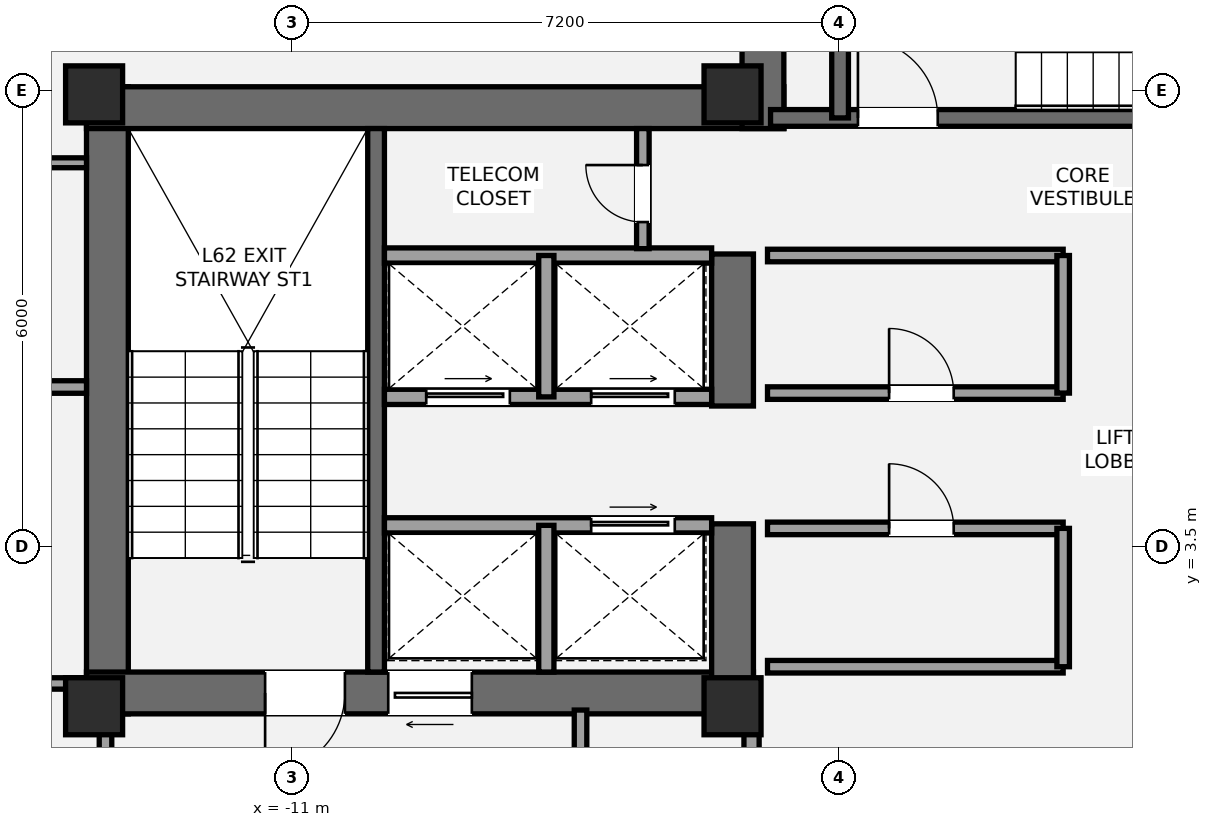
"""IFC4 building model, lengths in metres.
Left out: names, types, materials, properties, quantities, classifications, styles, units other than length and angle.
Written with IfcOpenShell. Run it as: python <this file> out.ifc"""

import sys

from ifc_helpers import new_model, si_unit, direction, frame, frame_2d, origin, origin_2d, place, context, subcontext, project, spatial, rectangle, extrude, element, fill, save


model = new_model("IFC4")
c1 = context("Model", 3, precision=1e-05, world=origin(), true_north=direction((0.0, 1.0)))
c2 = subcontext(c1, "Body", "Model", "MODEL_VIEW")
j1 = project(units=[si_unit("LENGTHUNIT", "METRE"), si_unit("PLANEANGLEUNIT", "RADIAN")], contexts=[c1])
p1 = place(None, origin())
s1 = spatial("IfcSite", under=j1, at=p1, CompositionType="ELEMENT")
p2 = place(p1, origin())
s2 = spatial("IfcBuilding", under=s1, at=p2, CompositionType="ELEMENT")
p3 = place(p2, frame((0.0, 0.0, 222.6)))
s3 = spatial("IfcBuildingStorey", under=s2, at=p3, CompositionType="ELEMENT", Elevation=222.6)
p4 = place(p3, frame((-13.425, 1.3, 0.0), z_axis=(0.0, 0.0, 1.0), x_axis=(0.0, 1.0, 0.0)))
e1 = element("IfcWall", 1, at=p4, inside=s3, PredefinedType="SHEAR", context=c2, shape_type="SweptSolid", body=[
    extrude(rectangle(XDim=8.25, YDim=0.55, at=frame_2d((4.125, 0.0))), origin(), (0.0, 0.0, 1.0), 3.15),
])
p5 = place(p3, frame((-13.7, 9.275, 0.0), z_axis=(0.0, 0.0, 1.0), x_axis=(1.0, 0.0, 0.0)))
e2 = element("IfcWall", 2, at=p5, inside=s3, PredefinedType="SHEAR", context=c2, shape_type="SweptSolid", body=[
    extrude(rectangle(XDim=9.175, YDim=0.55, at=frame_2d((4.587, 0.0))), origin(), (0.0, 0.0, 1.0), 3.15),
])
p6 = place(p3, frame((-4.925, 1.575, 0.0), z_axis=(0.0, 0.0, 1.0), x_axis=(-1.0, 0.0, 0.0)))
e3 = element("IfcWall", 3, at=p6, inside=s3, PredefinedType="SHEAR", context=c2, shape_type="SweptSolid", body=[
    extrude(rectangle(XDim=8.775, YDim=0.55, at=frame_2d((4.387, 0.0))), origin(), (0.0, 0.0, 1.0), 3.15),
])
p7 = place(p6, frame((5.375, 0.0, 0.0)))
e4 = element("IfcOpeningElement", 4, at=p7, cuts=e3, PredefinedType="OPENING", context=c2, shape_type="SweptSolid", body=[
    extrude(rectangle(XDim=1.05, YDim=2.15, at=frame_2d((0.525, 1.075))), frame((0.0, 0.285, 0.0), z_axis=(0.0, -1.0, 0.0), x_axis=(1.0, 0.0, 0.0)), (0.0, 0.0, 1.0), 0.57),
])
p8 = place(p6, frame((3.705, 0.0, 0.0)))
e5 = element("IfcOpeningElement", 5, at=p8, cuts=e3, PredefinedType="OPENING", context=c2, shape_type="SweptSolid", body=[
    extrude(rectangle(XDim=1.1, YDim=2.2, at=frame_2d((0.55, 1.1))), frame((0.0, 0.285, 0.0), z_axis=(0.0, -1.0, 0.0), x_axis=(1.0, 0.0, 0.0)), (0.0, 0.0, 1.0), 0.57),
])
p9 = place(p3, frame((-5.2, 1.3, 0.0), z_axis=(0.0, 0.0, 1.0), x_axis=(0.0, 1.0, 0.0)))
e6 = element("IfcWall", 6, at=p9, inside=s3, PredefinedType="SHEAR", context=c2, shape_type="SweptSolid", body=[
    extrude(rectangle(XDim=2.5, YDim=0.55, at=frame_2d((1.25, 0.0))), origin(), (0.0, 0.0, 1.0), 3.15),
])
p10 = place(p3, frame((-5.2, 5.35, 0.0), z_axis=(0.0, 0.0, 1.0), x_axis=(0.0, 1.0, 0.0)))
e7 = element("IfcWall", 7, at=p10, inside=s3, PredefinedType="SHEAR", context=c2, shape_type="SweptSolid", body=[
    extrude(rectangle(XDim=2.0, YDim=0.55, at=frame_2d((1.0, 0.0))), origin(), (0.0, 0.0, 1.0), 3.15),
])
p11 = place(p3, frame((-9.89, 1.85, 0.0), z_axis=(0.0, 0.0, 1.0), x_axis=(0.0, 1.0, 0.0)))
e8 = element("IfcWall", 8, at=p11, inside=s3, PredefinedType="SHEAR", context=c2, shape_type="SweptSolid", body=[
    extrude(rectangle(XDim=7.15, YDim=0.22, at=frame_2d((3.575, 0.0))), origin(), (0.0, 0.0, 1.0), 3.15),
])
p12 = place(p3, frame((-4.8, 9.0, 0.0), z_axis=(0.0, 0.0, 1.0), x_axis=(0.0, 1.0, 0.0)))
e9 = element("IfcWall", 9, at=p12, inside=s3, PredefinedType="SHEAR", context=c2, shape_type="SweptSolid", body=[
    extrude(rectangle(XDim=3.95, YDim=0.55, at=frame_2d((1.975, 0.0))), origin(), (0.0, 0.0, 1.0), 3.15),
])
p13 = place(p3, frame((-4.7, 9.14, 0.0), z_axis=(0.0, 0.0, 1.0), x_axis=(1.0, 0.0, 0.0)))
e10 = element("IfcWall", 10, at=p13, inside=s3, PredefinedType="SHEAR", context=c2, shape_type="SweptSolid", body=[
    extrude(rectangle(XDim=9.3, YDim=0.22, at=frame_2d((4.65, 0.0))), origin(), (0.0, 0.0, 1.0), 3.15),
])
p14 = place(p13, frame((1.15, 0.0, 0.0)))
e11 = element("IfcOpeningElement", 11, at=p14, cuts=e10, PredefinedType="OPENING", context=c2, shape_type="SweptSolid", body=[
    extrude(rectangle(XDim=1.05, YDim=2.15, at=frame_2d((0.525, 1.075))), frame((0.0, 0.12, 0.0), z_axis=(0.0, -1.0, 0.0), x_axis=(1.0, 0.0, 0.0)), (0.0, 0.0, 1.0), 0.24),
])
p15 = place(p3, frame((-3.785, 9.14, 0.0), z_axis=(0.0, 0.0, 1.0), x_axis=(0.0, 1.0, 0.0)))
e12 = element("IfcWall", 12, at=p15, inside=s3, PredefinedType="SHEAR", context=c2, shape_type="SweptSolid", body=[
    extrude(rectangle(XDim=3.26, YDim=0.22, at=frame_2d((1.63, 0.0))), origin(), (0.0, 0.0, 1.0), 3.15),
])
for number, where, z_axis, x_axis in (
    (13, (-13.6, 1.4, 0.0), (0.0, 0.0, 1.0), (1.0, 0.0, 0.0)),
    (14, (-13.6, 9.45, 0.0), (0.0, 0.0, 1.0), (1.0, 0.0, 0.0)),
    (15, (-5.2, 1.4, 0.0), (0.0, 0.0, 1.0), (1.0, 0.0, 0.0)),
    (16, (-5.2, 9.45, 0.0), (0.0, 0.0, 1.0), (1.0, 0.0, 0.0)),
):
    element("IfcColumn", number, at=place(p3, frame(where, z_axis=z_axis, x_axis=x_axis)), inside=s3, PredefinedType="PILASTER", context=c2, shape_type="SweptSolid", body=[
        extrude(rectangle(XDim=0.75, YDim=0.75, at=origin_2d()), origin(), (0.0, 0.0, 1.0), 3.15),
    ])
p16 = place(p3, frame((-17.126, 9.419, 0.0), z_axis=(0.0, 0.0, 1.0), x_axis=(0.827642668093, 0.561255391023, 0.0)))
e17 = element("IfcWall", 17, at=p16, inside=s3, PredefinedType="STANDARD", context=c2, shape_type="SweptSolid", body=[
    extrude(rectangle(XDim=3.738, YDim=0.44, at=frame_2d((1.869, 0.0))), origin(), (0.0, 0.0, 1.0), 2.336),
])
p17 = place(p16, frame((0.498, 0.0, 0.55)))
e18 = element("IfcOpeningElement", 18, at=p17, cuts=e17, PredefinedType="OPENING", context=c2, shape_type="SweptSolid", body=[
    extrude(rectangle(XDim=1.75, YDim=1.55, at=frame_2d((0.875, 0.775))), frame((0.0, 0.23, 0.0), z_axis=(0.0, -1.0, 0.0), x_axis=(1.0, 0.0, 0.0)), (0.0, 0.0, 1.0), 0.46),
])
p18 = place(p3, frame((-13.45, -2.15, 0.0), z_axis=(0.0, 0.0, 1.0), x_axis=(0.0, 1.0, 0.0)))
e19 = element("IfcWall", 19, at=p18, inside=s3, PredefinedType="PARTITIONING", context=c2, shape_type="SweptSolid", body=[
    extrude(rectangle(XDim=3.5, YDim=0.165, at=frame_2d((1.75, 0.0))), origin(), (0.0, 0.0, 1.0), 2.423),
])
p19 = place(p18, frame((0.67, 0.0, 0.0)))
e20 = element("IfcOpeningElement", 20, at=p19, cuts=e19, PredefinedType="OPENING", context=c2, shape_type="SweptSolid", body=[
    extrude(rectangle(XDim=1.05, YDim=2.15, at=frame_2d((0.525, 1.075))), frame((0.0, 0.093, 0.0), z_axis=(0.0, -1.0, 0.0), x_axis=(1.0, 0.0, 0.0)), (0.0, 0.0, 1.0), 0.185),
])
p20 = place(p3, frame((-7.2, -2.15, 0.0), z_axis=(0.0, 0.0, 1.0), x_axis=(0.0, 1.0, 0.0)))
e21 = element("IfcWall", 21, at=p20, inside=s3, PredefinedType="PARTITIONING", context=c2, shape_type="SweptSolid", body=[
    extrude(rectangle(XDim=3.5, YDim=0.165, at=frame_2d((1.75, 0.0))), origin(), (0.0, 0.0, 1.0), 2.423),
])
p21 = place(p3, frame((-4.95, -2.15, 0.0), z_axis=(0.0, 0.0, 1.0), x_axis=(0.0, 1.0, 0.0)))
e22 = element("IfcWall", 22, at=p21, inside=s3, PredefinedType="SOLIDWALL", context=c2, shape_type="SweptSolid", body=[
    extrude(rectangle(XDim=3.5, YDim=0.2, at=frame_2d((1.75, 0.0))), origin(), (0.0, 0.0, 1.0), 2.423),
])
p22 = place(p21, frame((0.95, 0.0, 0.0)))
e23 = element("IfcOpeningElement", 23, at=p22, cuts=e22, PredefinedType="OPENING", context=c2, shape_type="SweptSolid", body=[
    extrude(rectangle(XDim=0.75, YDim=2.1, at=frame_2d((0.375, 1.05))), frame((0.0, 0.11, 0.0), z_axis=(0.0, -1.0, 0.0), x_axis=(1.0, 0.0, 0.0)), (0.0, 0.0, 1.0), 0.22),
])
p23 = place(p3, frame((-9.78, 3.78, 0.0), z_axis=(0.0, 0.0, 1.0), x_axis=(1.0, 0.0, 0.0)))
e24 = element("IfcWall", 24, at=p23, inside=s3, PredefinedType="SOLIDWALL", context=c2, shape_type="SweptSolid", body=[
    extrude(rectangle(XDim=4.305, YDim=0.2, at=frame_2d((2.152, 0.0))), origin(), (0.0, 0.0, 1.0), 2.97),
])
p24 = place(p23, frame((2.72, 0.0, 0.0)))
e25 = element("IfcOpeningElement", 25, at=p24, cuts=e24, PredefinedType="OPENING", context=c2, shape_type="SweptSolid", body=[
    extrude(rectangle(XDim=1.1, YDim=2.2, at=frame_2d((0.55, 1.1))), frame((0.0, 0.11, 0.0), z_axis=(0.0, -1.0, 0.0), x_axis=(1.0, 0.0, 0.0)), (0.0, 0.0, 1.0), 0.22),
])
p25 = place(p3, frame((-7.65, 1.85, 0.0), z_axis=(0.0, 0.0, 1.0), x_axis=(0.0, 1.0, 0.0)))
e26 = element("IfcWall", 26, at=p25, inside=s3, PredefinedType="SOLIDWALL", context=c2, shape_type="SweptSolid", body=[
    extrude(rectangle(XDim=1.93, YDim=0.2, at=frame_2d((0.965, 0.0))), origin(), (0.0, 0.0, 1.0), 2.97),
])
p26 = place(p3, frame((-9.78, 5.47, 0.0), z_axis=(0.0, 0.0, 1.0), x_axis=(1.0, 0.0, 0.0)))
e27 = element("IfcWall", 27, at=p26, inside=s3, PredefinedType="SOLIDWALL", context=c2, shape_type="SweptSolid", body=[
    extrude(rectangle(XDim=4.305, YDim=0.2, at=frame_2d((2.152, 0.0))), origin(), (0.0, 0.0, 1.0), 2.97),
])
p27 = place(p26, frame((0.55, 0.0, 0.0)))
e28 = element("IfcOpeningElement", 28, at=p27, cuts=e27, PredefinedType="OPENING", context=c2, shape_type="SweptSolid", body=[
    extrude(rectangle(XDim=1.1, YDim=2.2, at=frame_2d((0.55, 1.1))), frame((0.0, 0.11, 0.0), z_axis=(0.0, -1.0, 0.0), x_axis=(1.0, 0.0, 0.0)), (0.0, 0.0, 1.0), 0.22),
])
p28 = place(p26, frame((2.72, 0.0, 0.0)))
e29 = element("IfcOpeningElement", 29, at=p28, cuts=e27, PredefinedType="OPENING", context=c2, shape_type="SweptSolid", body=[
    extrude(rectangle(XDim=1.1, YDim=2.2, at=frame_2d((0.55, 1.1))), frame((0.0, 0.11, 0.0), z_axis=(0.0, -1.0, 0.0), x_axis=(1.0, 0.0, 0.0)), (0.0, 0.0, 1.0), 0.22),
])
p29 = place(p3, frame((-9.78, 7.33, 0.0), z_axis=(0.0, 0.0, 1.0), x_axis=(1.0, 0.0, 0.0)))
e30 = element("IfcWall", 30, at=p29, inside=s3, PredefinedType="SOLIDWALL", context=c2, shape_type="SweptSolid", body=[
    extrude(rectangle(XDim=4.305, YDim=0.2, at=frame_2d((2.152, 0.0))), origin(), (0.0, 0.0, 1.0), 2.97),
])
p30 = place(p3, frame((-7.65, 5.47, 0.0), z_axis=(0.0, 0.0, 1.0), x_axis=(0.0, 1.0, 0.0)))
e31 = element("IfcWall", 31, at=p30, inside=s3, PredefinedType="SOLIDWALL", context=c2, shape_type="SweptSolid", body=[
    extrude(rectangle(XDim=1.86, YDim=0.2, at=frame_2d((0.93, 0.0))), origin(), (0.0, 0.0, 1.0), 2.97),
])
p31 = place(p3, frame((-4.74, 1.92, 0.0), z_axis=(0.0, 0.0, 1.0), x_axis=(1.0, 0.0, 0.0)))
e32 = element("IfcWall", 32, at=p31, inside=s3, PredefinedType="PARTITIONING", context=c2, shape_type="SweptSolid", body=[
    extrude(rectangle(XDim=3.89, YDim=0.165, at=frame_2d((1.945, 0.0))), origin(), (0.0, 0.0, 1.0), 2.11),
])
p32 = place(p3, frame((-4.74, 3.74, 0.0), z_axis=(0.0, 0.0, 1.0), x_axis=(1.0, 0.0, 0.0)))
e33 = element("IfcWall", 33, at=p32, inside=s3, PredefinedType="PARTITIONING", context=c2, shape_type="SweptSolid", body=[
    extrude(rectangle(XDim=3.89, YDim=0.165, at=frame_2d((1.945, 0.0))), origin(), (0.0, 0.0, 1.0), 2.97),
])
p33 = place(p32, frame((1.6, 0.0, 0.0)))
e34 = element("IfcOpeningElement", 34, at=p33, cuts=e33, PredefinedType="OPENING", context=c2, shape_type="SweptSolid", body=[
    extrude(rectangle(XDim=0.85, YDim=2.1, at=frame_2d((0.425, 1.05))), frame((0.0, 0.093, 0.0), z_axis=(0.0, -1.0, 0.0), x_axis=(1.0, 0.0, 0.0)), (0.0, 0.0, 1.0), 0.185),
])
p34 = place(p3, frame((-0.85, 1.92, 0.0), z_axis=(0.0, 0.0, 1.0), x_axis=(0.0, 1.0, 0.0)))
e35 = element("IfcWall", 35, at=p34, inside=s3, PredefinedType="PARTITIONING", context=c2, shape_type="SweptSolid", body=[
    extrude(rectangle(XDim=1.82, YDim=0.165, at=frame_2d((0.91, 0.0))), origin(), (0.0, 0.0, 1.0), 2.97),
])
p35 = place(p3, frame((-4.74, 5.52, 0.0), z_axis=(0.0, 0.0, 1.0), x_axis=(1.0, 0.0, 0.0)))
e36 = element("IfcWall", 36, at=p35, inside=s3, PredefinedType="PARTITIONING", context=c2, shape_type="SweptSolid", body=[
    extrude(rectangle(XDim=3.89, YDim=0.165, at=frame_2d((1.945, 0.0))), origin(), (0.0, 0.0, 1.0), 2.97),
])
p36 = place(p35, frame((1.6, 0.0, 0.0)))
e37 = element("IfcOpeningElement", 37, at=p36, cuts=e36, PredefinedType="OPENING", context=c2, shape_type="SweptSolid", body=[
    extrude(rectangle(XDim=0.85, YDim=2.1, at=frame_2d((0.425, 1.05))), frame((0.0, 0.093, 0.0), z_axis=(0.0, -1.0, 0.0), x_axis=(1.0, 0.0, 0.0)), (0.0, 0.0, 1.0), 0.185),
])
p37 = place(p3, frame((-4.74, 7.33, 0.0), z_axis=(0.0, 0.0, 1.0), x_axis=(1.0, 0.0, 0.0)))
e38 = element("IfcWall", 38, at=p37, inside=s3, PredefinedType="PARTITIONING", context=c2, shape_type="SweptSolid", body=[
    extrude(rectangle(XDim=3.89, YDim=0.165, at=frame_2d((1.945, 0.0))), origin(), (0.0, 0.0, 1.0), 2.97),
])
p38 = place(p3, frame((-0.85, 5.52, 0.0), z_axis=(0.0, 0.0, 1.0), x_axis=(0.0, 1.0, 0.0)))
e39 = element("IfcWall", 39, at=p38, inside=s3, PredefinedType="PARTITIONING", context=c2, shape_type="SweptSolid", body=[
    extrude(rectangle(XDim=1.81, YDim=0.165, at=frame_2d((0.905, 0.0))), origin(), (0.0, 0.0, 1.0), 2.97),
])
p39 = place(p3, frame((-6.38, 7.42, 0.0), z_axis=(0.0, 0.0, 1.0), x_axis=(0.0, 1.0, 0.0)))
e40 = element("IfcWall", 40, at=p39, inside=s3, PredefinedType="PARTITIONING", context=c2, shape_type="SweptSolid", body=[
    extrude(rectangle(XDim=1.58, YDim=0.165, at=frame_2d((0.79, 0.0))), origin(), (0.0, 0.0, 1.0), 2.97),
])
p40 = place(p39, frame((0.35, 0.0, 0.0)))
e41 = element("IfcOpeningElement", 41, at=p40, cuts=e40, PredefinedType="OPENING", context=c2, shape_type="SweptSolid", body=[
    extrude(rectangle(XDim=0.75, YDim=2.1, at=frame_2d((0.375, 1.05))), frame((0.0, 0.093, 0.0), z_axis=(0.0, -1.0, 0.0), x_axis=(1.0, 0.0, 0.0)), (0.0, 0.0, 1.0), 0.185),
])
p41 = place(p3, frame((-20.485, 5.6, 0.0), z_axis=(0.0, 0.0, 1.0), x_axis=(1.0, 0.0, 0.0)))
e42 = element("IfcWall", 42, at=p41, inside=s3, PredefinedType="PARTITIONING", context=c2, shape_type="SweptSolid", body=[
    extrude(rectangle(XDim=6.785, YDim=0.165, at=frame_2d((3.393, 0.0))), origin(), (0.0, 0.0, 1.0), 2.423),
])
p42 = place(p41, frame((2.481, 0.0, 0.0)))
e43 = element("IfcOpeningElement", 43, at=p42, cuts=e42, PredefinedType="OPENING", context=c2, shape_type="SweptSolid", body=[
    extrude(rectangle(XDim=0.85, YDim=2.1, at=frame_2d((0.425, 1.05))), frame((0.0, 0.093, 0.0), z_axis=(0.0, -1.0, 0.0), x_axis=(1.0, 0.0, 0.0)), (0.0, 0.0, 1.0), 0.185),
])
p43 = place(p3, frame((-17.95, 1.7, 0.0), z_axis=(0.0, 0.0, 1.0), x_axis=(1.0, 0.0, 0.0)))
e44 = element("IfcWall", 44, at=p43, inside=s3, PredefinedType="PLUMBINGWALL", context=c2, shape_type="SweptSolid", body=[
    extrude(rectangle(XDim=4.25, YDim=0.15, at=frame_2d((2.125, 0.0))), origin(), (0.0, 0.0, 1.0), 2.423),
])
p44 = place(p43, frame((2.85, 0.0, 0.0)))
e45 = element("IfcOpeningElement", 45, at=p44, cuts=e44, PredefinedType="OPENING", context=c2, shape_type="SweptSolid", body=[
    extrude(rectangle(XDim=0.8, YDim=2.1, at=frame_2d((0.4, 1.05))), frame((0.0, 0.085, 0.0), z_axis=(0.0, -1.0, 0.0), x_axis=(1.0, 0.0, 0.0)), (0.0, 0.0, 1.0), 0.17),
])
p45 = place(p43, frame((1.27, 0.0, 0.0)))
e46 = element("IfcOpeningElement", 46, at=p45, cuts=e44, PredefinedType="OPENING", context=c2, shape_type="SweptSolid", body=[
    extrude(rectangle(XDim=0.85, YDim=2.1, at=frame_2d((0.425, 1.05))), frame((0.0, 0.085, 0.0), z_axis=(0.0, -1.0, 0.0), x_axis=(1.0, 0.0, 0.0)), (0.0, 0.0, 1.0), 0.17),
])
p46 = place(p3, frame((-17.737, 8.55, 0.0), z_axis=(0.0, 0.0, 1.0), x_axis=(1.0, 0.0, 0.0)))
e47 = element("IfcWall", 47, at=p46, inside=s3, PredefinedType="PARTITIONING", context=c2, shape_type="SweptSolid", body=[
    extrude(rectangle(XDim=4.037, YDim=0.13, at=frame_2d((2.019, 0.0))), origin(), (0.0, 0.0, 1.0), 2.423),
])
p47 = place(p46, frame((1.138, 0.0, 0.0)))
e48 = element("IfcOpeningElement", 48, at=p47, cuts=e47, PredefinedType="OPENING", context=c2, shape_type="SweptSolid", body=[
    extrude(rectangle(XDim=0.85, YDim=2.1, at=frame_2d((0.425, 1.05))), frame((0.0, 0.075, 0.0), z_axis=(0.0, -1.0, 0.0), x_axis=(1.0, 0.0, 0.0)), (0.0, 0.0, 1.0), 0.15),
])
p48 = place(p7, origin())
e49 = element("IfcDoor", 49, at=p48, inside=s3, OperationType="SINGLE_SWING_RIGHT", PredefinedType="DOOR", context=c2, shape_type="SweptSolid", body=[
    extrude(rectangle(XDim=1.05, YDim=2.15, at=frame_2d((0.525, 1.075))), frame((0.0, 0.025, 0.0), z_axis=(0.0, -1.0, 0.0), x_axis=(1.0, 0.0, 0.0)), (0.0, 0.0, 1.0), 0.05),
])
fill(e4, e49)
p49 = place(p14, origin())
e50 = element("IfcDoor", 50, at=p49, inside=s3, OperationType="SINGLE_SWING_LEFT", PredefinedType="DOOR", context=c2, shape_type="SweptSolid", body=[
    extrude(rectangle(XDim=1.05, YDim=2.15, at=frame_2d((0.525, 1.075))), frame((0.0, 0.025, 0.0), z_axis=(0.0, -1.0, 0.0), x_axis=(1.0, 0.0, 0.0)), (0.0, 0.0, 1.0), 0.05),
])
fill(e11, e50)
p50 = place(p8, origin())
e51 = element("IfcDoor", 51, at=p50, inside=s3, OperationType="SLIDING_TO_LEFT", PredefinedType="DOOR", context=c2, shape_type="SweptSolid", body=[
    extrude(rectangle(XDim=1.1, YDim=2.2, at=frame_2d((0.55, 1.1))), frame((0.0, 0.025, 0.0), z_axis=(0.0, -1.0, 0.0), x_axis=(1.0, 0.0, 0.0)), (0.0, 0.0, 1.0), 0.05),
])
fill(e5, e51)
p51 = place(p27, origin())
e52 = element("IfcDoor", 52, at=p51, inside=s3, OperationType="SLIDING_TO_LEFT", PredefinedType="DOOR", context=c2, shape_type="SweptSolid", body=[
    extrude(rectangle(XDim=1.1, YDim=2.2, at=frame_2d((0.55, 1.1))), frame((0.0, 0.025, 0.0), z_axis=(0.0, -1.0, 0.0), x_axis=(1.0, 0.0, 0.0)), (0.0, 0.0, 1.0), 0.05),
])
fill(e28, e52)
p52 = place(p28, origin())
e53 = element("IfcDoor", 53, at=p52, inside=s3, OperationType="SLIDING_TO_LEFT", PredefinedType="DOOR", context=c2, shape_type="SweptSolid", body=[
    extrude(rectangle(XDim=1.1, YDim=2.2, at=frame_2d((0.55, 1.1))), frame((0.0, 0.025, 0.0), z_axis=(0.0, -1.0, 0.0), x_axis=(1.0, 0.0, 0.0)), (0.0, 0.0, 1.0), 0.05),
])
fill(e29, e53)
p53 = place(p24, origin())
e54 = element("IfcDoor", 54, at=p53, inside=s3, OperationType="SLIDING_TO_LEFT", PredefinedType="DOOR", context=c2, shape_type="SweptSolid", body=[
    extrude(rectangle(XDim=1.1, YDim=2.2, at=frame_2d((0.55, 1.1))), frame((0.0, 0.025, 0.0), z_axis=(0.0, -1.0, 0.0), x_axis=(1.0, 0.0, 0.0)), (0.0, 0.0, 1.0), 0.05),
])
fill(e25, e54)
p54 = place(p33, origin())
e55 = element("IfcDoor", 55, at=p54, inside=s3, OperationType="SINGLE_SWING_LEFT", PredefinedType="DOOR", context=c2, shape_type="SweptSolid", body=[
    extrude(rectangle(XDim=0.85, YDim=2.1, at=frame_2d((0.425, 1.05))), frame((0.0, 0.025, 0.0), z_axis=(0.0, -1.0, 0.0), x_axis=(1.0, 0.0, 0.0)), (0.0, 0.0, 1.0), 0.05),
])
fill(e34, e55)
p55 = place(p36, origin())
e56 = element("IfcDoor", 56, at=p55, inside=s3, OperationType="SINGLE_SWING_LEFT", PredefinedType="DOOR", context=c2, shape_type="SweptSolid", body=[
    extrude(rectangle(XDim=0.85, YDim=2.1, at=frame_2d((0.425, 1.05))), frame((0.0, 0.025, 0.0), z_axis=(0.0, -1.0, 0.0), x_axis=(1.0, 0.0, 0.0)), (0.0, 0.0, 1.0), 0.05),
])
fill(e37, e56)
p56 = place(p40, origin())
e57 = element("IfcDoor", 57, at=p56, inside=s3, OperationType="SINGLE_SWING_RIGHT", PredefinedType="DOOR", context=c2, shape_type="SweptSolid", body=[
    extrude(rectangle(XDim=0.75, YDim=2.1, at=frame_2d((0.375, 1.05))), frame((0.0, 0.025, 0.0), z_axis=(0.0, -1.0, 0.0), x_axis=(1.0, 0.0, 0.0)), (0.0, 0.0, 1.0), 0.05),
])
fill(e41, e57)
save(model, sys.argv[1])
